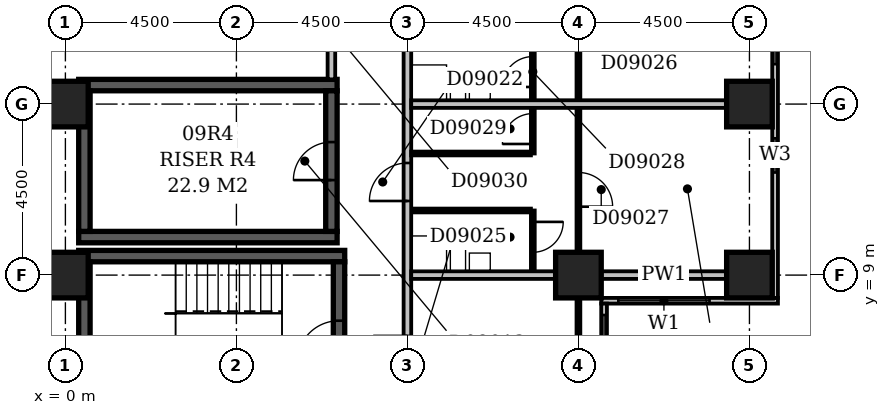
"""IFC4 building model, lengths in metres.
Left out: names, types, materials, properties, quantities, classifications, styles, units other than length and angle.
Written with IfcOpenShell. Run it as: python <this file> out.ifc"""

import sys

from ifc_helpers import new_model, si_unit, direction, frame, frame_2d, origin, origin_2d, place, context, subcontext, project, spatial, rectangle, extrude, element, fill, save


model = new_model("IFC4")
c1 = context("Model", 3, precision=1e-05, world=origin(), true_north=direction((0.0, 1.0)))
c2 = subcontext(c1, "Body", "Model", "MODEL_VIEW")
j1 = project(units=[si_unit("LENGTHUNIT", "METRE"), si_unit("PLANEANGLEUNIT", "RADIAN")], contexts=[c1])
p1 = place(None, origin())
s1 = spatial("IfcSite", under=j1, at=p1, CompositionType="ELEMENT")
p2 = place(p1, origin())
s2 = spatial("IfcBuilding", under=s1, at=p2, CompositionType="ELEMENT")
p3 = place(p2, frame((0.0, 0.0, 43.4)))
s3 = spatial("IfcBuildingStorey", under=s2, at=p3, CompositionType="ELEMENT", Elevation=43.4)
p4 = place(p3, frame((0.35, 9.5, -0.3), z_axis=(0.0, 0.0, 1.0), x_axis=(1.0, 0.0, 0.0)))
e1 = element("IfcWall", 1, at=p4, inside=s3, PredefinedType="SHEAR", context=c2, shape_type="SweptSolid", body=[
    extrude(rectangle(XDim=7.0, YDim=0.3, at=frame_2d((3.5, 0.0))), origin(), (0.0, 0.0, 1.0), 3.6),
])
for number, where, z_axis, x_axis in (
    (2, (0.35, 10.0, -0.3), (0.0, 0.0, 1.0), (1.0, 0.0, 0.0)),
    (3, (0.35, 14.0, -0.3), (0.0, 0.0, 1.0), (1.0, 0.0, 0.0)),
):
    element("IfcWall", number, at=place(p3, frame(where, z_axis=z_axis, x_axis=x_axis)), inside=s3, PredefinedType="SHEAR", context=c2, shape_type="SweptSolid", body=[
        extrude(rectangle(XDim=6.8, YDim=0.3, at=frame_2d((3.4, 0.0))), origin(), (0.0, 0.0, 1.0), 3.6),
    ])
p5 = place(p3, frame((0.5, 5.15, -0.3), z_axis=(0.0, 0.0, 1.0), x_axis=(0.0, 1.0, 0.0)))
e4 = element("IfcWall", 4, at=p5, inside=s3, PredefinedType="SHEAR", context=c2, shape_type="SweptSolid", body=[
    extrude(rectangle(XDim=4.2, YDim=0.3, at=frame_2d((2.1, 0.0))), origin(), (0.0, 0.0, 1.0), 3.6),
])
p6 = place(p3, frame((0.5, 10.15, -0.3), z_axis=(0.0, 0.0, 1.0), x_axis=(0.0, 1.0, 0.0)))
e5 = element("IfcWall", 5, at=p6, inside=s3, PredefinedType="SHEAR", context=c2, shape_type="SweptSolid", body=[
    extrude(rectangle(XDim=3.7, YDim=0.3, at=frame_2d((1.85, 0.0))), origin(), (0.0, 0.0, 1.0), 3.6),
])
p7 = place(p3, frame((7.0, 10.15, -0.3), z_axis=(0.0, 0.0, 1.0), x_axis=(0.0, 1.0, 0.0)))
e6 = element("IfcWall", 6, at=p7, inside=s3, PredefinedType="SHEAR", context=c2, shape_type="SweptSolid", body=[
    extrude(rectangle(XDim=3.7, YDim=0.3, at=frame_2d((1.85, 0.0))), origin(), (0.0, 0.0, 1.0), 3.6),
])
p8 = place(p7, frame((1.35, 0.0, 0.3)))
e7 = element("IfcOpeningElement", 7, at=p8, cuts=e6, PredefinedType="OPENING", context=c2, shape_type="SweptSolid", body=[
    extrude(rectangle(XDim=1.0, YDim=2.1, at=frame_2d((0.5, 1.05))), frame((0.0, 0.162, 0.0), z_axis=(0.0, -1.0, 0.0), x_axis=(1.0, 0.0, 0.0)), (0.0, 0.0, 1.0), 0.324),
])
p9 = place(p3, frame((7.2, 5.15, -0.3), z_axis=(0.0, 0.0, 1.0), x_axis=(0.0, 1.0, 0.0)))
e8 = element("IfcWall", 8, at=p9, inside=s3, PredefinedType="SHEAR", context=c2, shape_type="SweptSolid", body=[
    extrude(rectangle(XDim=4.2, YDim=0.3, at=frame_2d((2.1, 0.0))), origin(), (0.0, 0.0, 1.0), 3.6),
])
p10 = place(p9, frame((1.55, 0.0, 0.3)))
e9 = element("IfcOpeningElement", 9, at=p10, cuts=e8, PredefinedType="OPENING", context=c2, shape_type="SweptSolid", body=[
    extrude(rectangle(XDim=1.1, YDim=2.1, at=frame_2d((0.55, 1.05))), frame((0.0, 0.162, 0.0), z_axis=(0.0, -1.0, 0.0), x_axis=(1.0, 0.0, 0.0)), (0.0, 0.0, 1.0), 0.324),
])
for number, where, z_axis, x_axis in (
    (10, (0.0, 9.0, -0.3), (0.0, 0.0, 1.0), (1.0, 0.0, 0.0)),
    (11, (13.5, 9.0, -0.3), (0.0, 0.0, 1.0), (1.0, 0.0, 0.0)),
    (12, (18.0, 9.0, -0.3), (0.0, 0.0, 1.0), (1.0, 0.0, 0.0)),
    (13, (0.0, 13.5, -0.3), (0.0, 0.0, 1.0), (1.0, 0.0, 0.0)),
    (14, (18.0, 13.5, -0.3), (0.0, 0.0, 1.0), (1.0, 0.0, 0.0)),
):
    element("IfcColumn", number, at=place(p3, frame(where, z_axis=z_axis, x_axis=x_axis)), inside=s3, PredefinedType="COLUMN", context=c2, shape_type="SweptSolid", body=[
        extrude(rectangle(XDim=1.2, YDim=1.2, at=origin_2d()), origin(), (0.0, 0.0, 1.0), 3.6),
    ])
p11 = place(p3, frame((14.175, 3.9, 0.0), z_axis=(0.0, 0.0, 1.0), x_axis=(0.0, 1.0, 0.0)))
e15 = element("IfcWall", 15, at=p11, inside=s3, PredefinedType="STANDARD", context=c2, shape_type="SweptSolid", body=[
    extrude(rectangle(XDim=4.35, YDim=0.15, at=frame_2d((2.175, 0.0))), origin(), (0.0, 0.0, 1.0), 2.7),
])
p12 = place(p11, frame((1.65, 0.0, 0.6)))
e16 = element("IfcOpeningElement", 16, at=p12, cuts=e15, PredefinedType="OPENING", context=c2, shape_type="SweptSolid", body=[
    extrude(rectangle(XDim=2.4, YDim=1.8, at=frame_2d((1.2, 0.9))), frame((0.0, 0.087, 0.0), z_axis=(0.0, -1.0, 0.0), x_axis=(1.0, 0.0, 0.0)), (0.0, 0.0, 1.0), 0.174),
])
p13 = place(p3, frame((14.1, 8.325, 0.0), z_axis=(0.0, 0.0, 1.0), x_axis=(1.0, 0.0, 0.0)))
e17 = element("IfcWall", 17, at=p13, inside=s3, PredefinedType="STANDARD", context=c2, shape_type="SweptSolid", body=[
    extrude(rectangle(XDim=4.65, YDim=0.15, at=frame_2d((2.325, 0.0))), origin(), (0.0, 0.0, 1.0), 2.7),
])
p14 = place(p13, frame((0.45, 0.0, 0.6)))
e18 = element("IfcOpeningElement", 18, at=p14, cuts=e17, PredefinedType="OPENING", context=c2, shape_type="SweptSolid", body=[
    extrude(rectangle(XDim=2.4, YDim=1.8, at=frame_2d((1.2, 0.9))), frame((0.0, 0.087, 0.0), z_axis=(0.0, -1.0, 0.0), x_axis=(1.0, 0.0, 0.0)), (0.0, 0.0, 1.0), 0.174),
])
p15 = place(p3, frame((18.675, 8.4, 0.0), z_axis=(0.0, 0.0, 1.0), x_axis=(0.0, 1.0, 0.0)))
e19 = element("IfcWall", 19, at=p15, inside=s3, PredefinedType="STANDARD", context=c2, shape_type="SweptSolid", body=[
    extrude(rectangle(XDim=8.85, YDim=0.15, at=frame_2d((4.425, 0.0))), origin(), (0.0, 0.0, 1.0), 2.7),
])
p16 = place(p15, frame((3.299, 0.0, 0.6)))
e20 = element("IfcOpeningElement", 20, at=p16, cuts=e19, PredefinedType="OPENING", context=c2, shape_type="SweptSolid", body=[
    extrude(rectangle(XDim=0.9, YDim=1.8, at=frame_2d((0.45, 0.9))), frame((0.0, 0.087, 0.0), z_axis=(0.0, -1.0, 0.0), x_axis=(1.0, 0.0, 0.0)), (0.0, 0.0, 1.0), 0.174),
])
p17 = place(p15, frame((6.15, 0.0, 0.6)))
e21 = element("IfcOpeningElement", 21, at=p17, cuts=e19, PredefinedType="OPENING", context=c2, shape_type="SweptSolid", body=[
    extrude(rectangle(XDim=2.4, YDim=1.8, at=frame_2d((1.2, 0.9))), frame((0.0, 0.087, 0.0), z_axis=(0.0, -1.0, 0.0), x_axis=(1.0, 0.0, 0.0)), (0.0, 0.0, 1.0), 0.174),
])
p18 = place(p3, frame((9.0, 5.0, 0.0), z_axis=(0.0, 0.0, 1.0), x_axis=(0.0, 1.0, 0.0)))
e22 = element("IfcWall", 22, at=p18, inside=s3, PredefinedType="PARTITIONING", context=c2, shape_type="SweptSolid", body=[
    extrude(rectangle(XDim=44.5, YDim=0.2, at=frame_2d((22.25, 0.0))), origin(), (0.0, 0.0, 1.0), 3.3),
])
p19 = place(p18, frame((17.8, 0.0, 0.0)))
e23 = element("IfcOpeningElement", 23, at=p19, cuts=e22, PredefinedType="OPENING", context=c2, shape_type="SweptSolid", body=[
    extrude(rectangle(XDim=1.0, YDim=2.1, at=frame_2d((0.5, 1.05))), frame((0.0, 0.112, 0.0), z_axis=(0.0, -1.0, 0.0), x_axis=(1.0, 0.0, 0.0)), (0.0, 0.0, 1.0), 0.224),
])
p20 = place(p18, frame((14.95, 0.0, 0.0)))
e24 = element("IfcOpeningElement", 24, at=p20, cuts=e22, PredefinedType="OPENING", context=c2, shape_type="SweptSolid", body=[
    extrude(rectangle(XDim=1.0, YDim=2.1, at=frame_2d((0.5, 1.05))), frame((0.0, 0.112, 0.0), z_axis=(0.0, -1.0, 0.0), x_axis=(1.0, 0.0, 0.0)), (0.0, 0.0, 1.0), 0.224),
])
p21 = place(p18, frame((10.45, 0.0, 0.0)))
e25 = element("IfcOpeningElement", 25, at=p21, cuts=e22, PredefinedType="OPENING", context=c2, shape_type="SweptSolid", body=[
    extrude(rectangle(XDim=1.0, YDim=2.1, at=frame_2d((0.5, 1.05))), frame((0.0, 0.112, 0.0), z_axis=(0.0, -1.0, 0.0), x_axis=(1.0, 0.0, 0.0)), (0.0, 0.0, 1.0), 0.224),
])
p22 = place(p18, frame((5.95, 0.0, 0.0)))
e26 = element("IfcOpeningElement", 26, at=p22, cuts=e22, PredefinedType="OPENING", context=c2, shape_type="SweptSolid", body=[
    extrude(rectangle(XDim=1.0, YDim=2.1, at=frame_2d((0.5, 1.05))), frame((0.0, 0.112, 0.0), z_axis=(0.0, -1.0, 0.0), x_axis=(1.0, 0.0, 0.0)), (0.0, 0.0, 1.0), 0.224),
])
p23 = place(p18, frame((32.75, 0.0, 0.0)))
e27 = element("IfcOpeningElement", 27, at=p23, cuts=e22, PredefinedType="OPENING", context=c2, shape_type="SweptSolid", body=[
    extrude(rectangle(XDim=0.9, YDim=2.1, at=frame_2d((0.45, 1.05))), frame((0.0, 0.112, 0.0), z_axis=(0.0, -1.0, 0.0), x_axis=(1.0, 0.0, 0.0)), (0.0, 0.0, 1.0), 0.224),
])
p24 = place(p18, frame((1.5, 0.0, 0.0)))
e28 = element("IfcOpeningElement", 28, at=p24, cuts=e22, PredefinedType="OPENING", context=c2, shape_type="SweptSolid", body=[
    extrude(rectangle(XDim=0.9, YDim=2.1, at=frame_2d((0.45, 1.05))), frame((0.0, 0.112, 0.0), z_axis=(0.0, -1.0, 0.0), x_axis=(1.0, 0.0, 0.0)), (0.0, 0.0, 1.0), 0.224),
])
p25 = place(p3, frame((13.5, 5.1, 0.0), z_axis=(0.0, 0.0, 1.0), x_axis=(0.0, 1.0, 0.0)))
e29 = element("IfcWall", 29, at=p25, inside=s3, PredefinedType="PARTITIONING", context=c2, shape_type="SweptSolid", body=[
    extrude(rectangle(XDim=3.3, YDim=0.1, at=frame_2d((1.65, 0.0))), origin(), (0.0, 0.0, 1.0), 2.7),
])
p26 = place(p3, frame((9.1, 9.0, 0.0), z_axis=(0.0, 0.0, 1.0), x_axis=(1.0, 0.0, 0.0)))
e30 = element("IfcWall", 30, at=p26, inside=s3, PredefinedType="PARTITIONING", context=c2, shape_type="SweptSolid", body=[
    extrude(rectangle(XDim=3.8, YDim=0.2, at=frame_2d((1.9, 0.0))), origin(), (0.0, 0.0, 1.0), 3.3),
])
p27 = place(p3, frame((14.1, 9.0, 0.0), z_axis=(0.0, 0.0, 1.0), x_axis=(1.0, 0.0, 0.0)))
e31 = element("IfcWall", 31, at=p27, inside=s3, PredefinedType="PARTITIONING", context=c2, shape_type="SweptSolid", body=[
    extrude(rectangle(XDim=3.3, YDim=0.2, at=frame_2d((1.65, 0.0))), origin(), (0.0, 0.0, 1.0), 2.7),
])
p28 = place(p3, frame((12.3, 9.1, 0.0), z_axis=(0.0, 0.0, 1.0), x_axis=(0.0, 1.0, 0.0)))
e32 = element("IfcWall", 32, at=p28, inside=s3, PredefinedType="PARTITIONING", context=c2, shape_type="SweptSolid", body=[
    extrude(rectangle(XDim=1.6, YDim=0.1, at=frame_2d((0.8, 0.0))), origin(), (0.0, 0.0, 1.0), 3.3),
])
p29 = place(p28, frame((0.5, 0.0, 0.0)))
e33 = element("IfcOpeningElement", 33, at=p29, cuts=e32, PredefinedType="OPENING", context=c2, shape_type="SweptSolid", body=[
    extrude(rectangle(XDim=0.8, YDim=2.1, at=frame_2d((0.4, 1.05))), frame((0.0, 0.062, 0.0), z_axis=(0.0, -1.0, 0.0), x_axis=(1.0, 0.0, 0.0)), (0.0, 0.0, 1.0), 0.124),
])
p30 = place(p3, frame((13.5, 9.6, 0.0), z_axis=(0.0, 0.0, 1.0), x_axis=(0.0, 1.0, 0.0)))
e34 = element("IfcWall", 34, at=p30, inside=s3, PredefinedType="PARTITIONING", context=c2, shape_type="SweptSolid", body=[
    extrude(rectangle(XDim=8.3, YDim=0.1, at=frame_2d((4.15, 0.0))), origin(), (0.0, 0.0, 1.0), 3.3),
])
p31 = place(p30, frame((5.7, 0.0, 0.0)))
e35 = element("IfcOpeningElement", 35, at=p31, cuts=e34, PredefinedType="OPENING", context=c2, shape_type="SweptSolid", body=[
    extrude(rectangle(XDim=0.9, YDim=2.1, at=frame_2d((0.45, 1.05))), frame((0.0, 0.062, 0.0), z_axis=(0.0, -1.0, 0.0), x_axis=(1.0, 0.0, 0.0)), (0.0, 0.0, 1.0), 0.124),
])
p32 = place(p30, frame((1.2, 0.0, 0.0)))
e36 = element("IfcOpeningElement", 36, at=p32, cuts=e34, PredefinedType="OPENING", context=c2, shape_type="SweptSolid", body=[
    extrude(rectangle(XDim=0.9, YDim=2.1, at=frame_2d((0.45, 1.05))), frame((0.0, 0.062, 0.0), z_axis=(0.0, -1.0, 0.0), x_axis=(1.0, 0.0, 0.0)), (0.0, 0.0, 1.0), 0.124),
])
p33 = place(p3, frame((9.1, 10.7, 0.0), z_axis=(0.0, 0.0, 1.0), x_axis=(1.0, 0.0, 0.0)))
e37 = element("IfcWall", 37, at=p33, inside=s3, PredefinedType="PLUMBINGWALL", context=c2, shape_type="SweptSolid", body=[
    extrude(rectangle(XDim=3.15, YDim=0.1, at=frame_2d((1.575, 0.0))), origin(), (0.0, 0.0, 1.0), 3.3),
])
p34 = place(p3, frame((9.1, 12.2, 0.0), z_axis=(0.0, 0.0, 1.0), x_axis=(1.0, 0.0, 0.0)))
e38 = element("IfcWall", 38, at=p34, inside=s3, PredefinedType="PARTITIONING", context=c2, shape_type="SweptSolid", body=[
    extrude(rectangle(XDim=3.15, YDim=0.1, at=frame_2d((1.575, 0.0))), origin(), (0.0, 0.0, 1.0), 3.3),
])
p35 = place(p3, frame((12.3, 12.2, 0.0), z_axis=(0.0, 0.0, 1.0), x_axis=(0.0, 1.0, 0.0)))
e39 = element("IfcWall", 39, at=p35, inside=s3, PredefinedType="PARTITIONING", context=c2, shape_type="SweptSolid", body=[
    extrude(rectangle(XDim=3.0, YDim=0.1, at=frame_2d((1.5, 0.0))), origin(), (0.0, 0.0, 1.0), 3.3),
])
p36 = place(p35, frame((1.75, 0.0, 0.0)))
e40 = element("IfcOpeningElement", 40, at=p36, cuts=e39, PredefinedType="OPENING", context=c2, shape_type="SweptSolid", body=[
    extrude(rectangle(XDim=0.8, YDim=2.1, at=frame_2d((0.4, 1.05))), frame((0.0, 0.062, 0.0), z_axis=(0.0, -1.0, 0.0), x_axis=(1.0, 0.0, 0.0)), (0.0, 0.0, 1.0), 0.124),
])
p37 = place(p35, frame((0.25, 0.0, 0.0)))
e41 = element("IfcOpeningElement", 41, at=p37, cuts=e39, PredefinedType="OPENING", context=c2, shape_type="SweptSolid", body=[
    extrude(rectangle(XDim=0.8, YDim=2.1, at=frame_2d((0.4, 1.05))), frame((0.0, 0.062, 0.0), z_axis=(0.0, -1.0, 0.0), x_axis=(1.0, 0.0, 0.0)), (0.0, 0.0, 1.0), 0.124),
])
p38 = place(p3, frame((9.1, 13.5, 0.0), z_axis=(0.0, 0.0, 1.0), x_axis=(1.0, 0.0, 0.0)))
e42 = element("IfcWall", 42, at=p38, inside=s3, PredefinedType="PARTITIONING", context=c2, shape_type="SweptSolid", body=[
    extrude(rectangle(XDim=8.3, YDim=0.2, at=frame_2d((4.15, 0.0))), origin(), (0.0, 0.0, 1.0), 3.3),
])
p39 = place(p3, frame((7.0, 14.15, 0.0), z_axis=(0.0, 0.0, 1.0), x_axis=(0.0, 1.0, 0.0)))
e43 = element("IfcWall", 43, at=p39, inside=s3, PredefinedType="PARTITIONING", context=c2, shape_type="SweptSolid", body=[
    extrude(rectangle(XDim=4.2, YDim=0.2, at=frame_2d((2.1, 0.0))), origin(), (0.0, 0.0, 1.0), 3.3),
])
p40 = place(p39, frame((1.6, 0.0, 0.0)))
e44 = element("IfcOpeningElement", 44, at=p40, cuts=e43, PredefinedType="OPENING", context=c2, shape_type="SweptSolid", body=[
    extrude(rectangle(XDim=1.0, YDim=2.1, at=frame_2d((0.5, 1.05))), frame((0.0, 0.112, 0.0), z_axis=(0.0, -1.0, 0.0), x_axis=(1.0, 0.0, 0.0)), (0.0, 0.0, 1.0), 0.224),
])
p41 = place(p12, origin())
e45 = element("IfcWindow", 45, at=p41, inside=s3, PartitioningType="SINGLE_PANEL", PredefinedType="WINDOW", context=c2, shape_type="SweptSolid", body=[
    extrude(rectangle(XDim=2.4, YDim=1.8, at=frame_2d((1.2, 0.9))), frame((0.0, 0.03, 0.0), z_axis=(0.0, -1.0, 0.0), x_axis=(1.0, 0.0, 0.0)), (0.0, 0.0, 1.0), 0.06),
])
fill(e16, e45)
p42 = place(p14, origin())
e46 = element("IfcWindow", 46, at=p42, inside=s3, PartitioningType="SINGLE_PANEL", PredefinedType="WINDOW", context=c2, shape_type="SweptSolid", body=[
    extrude(rectangle(XDim=2.4, YDim=1.8, at=frame_2d((1.2, 0.9))), frame((0.0, 0.03, 0.0), z_axis=(0.0, -1.0, 0.0), x_axis=(1.0, 0.0, 0.0)), (0.0, 0.0, 1.0), 0.06),
])
fill(e18, e46)
p43 = place(p16, origin())
e47 = element("IfcWindow", 47, at=p43, inside=s3, PartitioningType="SINGLE_PANEL", PredefinedType="WINDOW", context=c2, shape_type="SweptSolid", body=[
    extrude(rectangle(XDim=0.9, YDim=1.8, at=frame_2d((0.45, 0.9))), frame((0.0, 0.03, 0.0), z_axis=(0.0, -1.0, 0.0), x_axis=(1.0, 0.0, 0.0)), (0.0, 0.0, 1.0), 0.06),
])
fill(e20, e47)
p44 = place(p17, origin())
e48 = element("IfcWindow", 48, at=p44, inside=s3, PartitioningType="SINGLE_PANEL", PredefinedType="WINDOW", context=c2, shape_type="SweptSolid", body=[
    extrude(rectangle(XDim=2.4, YDim=1.8, at=frame_2d((1.2, 0.9))), frame((0.0, 0.03, 0.0), z_axis=(0.0, -1.0, 0.0), x_axis=(1.0, 0.0, 0.0)), (0.0, 0.0, 1.0), 0.06),
])
fill(e21, e48)
p45 = place(p8, origin())
e49 = element("IfcDoor", 49, at=p45, inside=s3, OperationType="SINGLE_SWING_LEFT", PredefinedType="DOOR", context=c2, shape_type="SweptSolid", body=[
    extrude(rectangle(XDim=1.0, YDim=2.1, at=frame_2d((0.5, 1.05))), frame((0.0, 0.025, 0.0), z_axis=(0.0, -1.0, 0.0), x_axis=(1.0, 0.0, 0.0)), (0.0, 0.0, 1.0), 0.05),
])
fill(e7, e49)
p46 = place(p10, origin())
e50 = element("IfcDoor", 50, at=p46, inside=s3, OperationType="SINGLE_SWING_LEFT", PredefinedType="DOOR", context=c2, shape_type="SweptSolid", body=[
    extrude(rectangle(XDim=1.1, YDim=2.1, at=frame_2d((0.55, 1.05))), frame((0.0, 0.025, 0.0), z_axis=(0.0, -1.0, 0.0), x_axis=(1.0, 0.0, 0.0)), (0.0, 0.0, 1.0), 0.05),
])
fill(e9, e50)
p47 = place(p22, origin())
e51 = element("IfcDoor", 51, at=p47, inside=s3, OperationType="SINGLE_SWING_LEFT", PredefinedType="DOOR", context=c2, shape_type="SweptSolid", body=[
    extrude(rectangle(XDim=1.0, YDim=2.1, at=frame_2d((0.5, 1.05))), frame((0.0, 0.025, 0.0), z_axis=(0.0, -1.0, 0.0), x_axis=(1.0, 0.0, 0.0)), (0.0, 0.0, 1.0), 0.05),
])
fill(e26, e51)
p48 = place(p29, origin())
e52 = element("IfcDoor", 52, at=p48, inside=s3, OperationType="SINGLE_SWING_RIGHT", PredefinedType="DOOR", context=c2, shape_type="SweptSolid", body=[
    extrude(rectangle(XDim=0.8, YDim=2.1, at=frame_2d((0.4, 1.05))), frame((0.0, 0.025, 0.0), z_axis=(0.0, -1.0, 0.0), x_axis=(1.0, 0.0, 0.0)), (0.0, 0.0, 1.0), 0.05),
])
fill(e33, e52)
p49 = place(p32, frame((0.9, 0.0, 0.0), z_axis=(0.0, 0.0, 1.0), x_axis=(-1.0, 0.0, 0.0)))
e53 = element("IfcDoor", 53, at=p49, inside=s3, OperationType="SINGLE_SWING_RIGHT", PredefinedType="DOOR", context=c2, shape_type="SweptSolid", body=[
    extrude(rectangle(XDim=0.9, YDim=2.1, at=frame_2d((0.45, 1.05))), frame((0.0, 0.025, 0.0), z_axis=(0.0, -1.0, 0.0), x_axis=(1.0, 0.0, 0.0)), (0.0, 0.0, 1.0), 0.05),
])
fill(e36, e53)
p50 = place(p36, origin())
e54 = element("IfcDoor", 54, at=p50, inside=s3, OperationType="SINGLE_SWING_LEFT", PredefinedType="DOOR", context=c2, shape_type="SweptSolid", body=[
    extrude(rectangle(XDim=0.8, YDim=2.1, at=frame_2d((0.4, 1.05))), frame((0.0, 0.025, 0.0), z_axis=(0.0, -1.0, 0.0), x_axis=(1.0, 0.0, 0.0)), (0.0, 0.0, 1.0), 0.05),
])
fill(e40, e54)
p51 = place(p37, origin())
e55 = element("IfcDoor", 55, at=p51, inside=s3, OperationType="SINGLE_SWING_LEFT", PredefinedType="DOOR", context=c2, shape_type="SweptSolid", body=[
    extrude(rectangle(XDim=0.8, YDim=2.1, at=frame_2d((0.4, 1.05))), frame((0.0, 0.025, 0.0), z_axis=(0.0, -1.0, 0.0), x_axis=(1.0, 0.0, 0.0)), (0.0, 0.0, 1.0), 0.05),
])
fill(e41, e55)
save(model, sys.argv[1])
